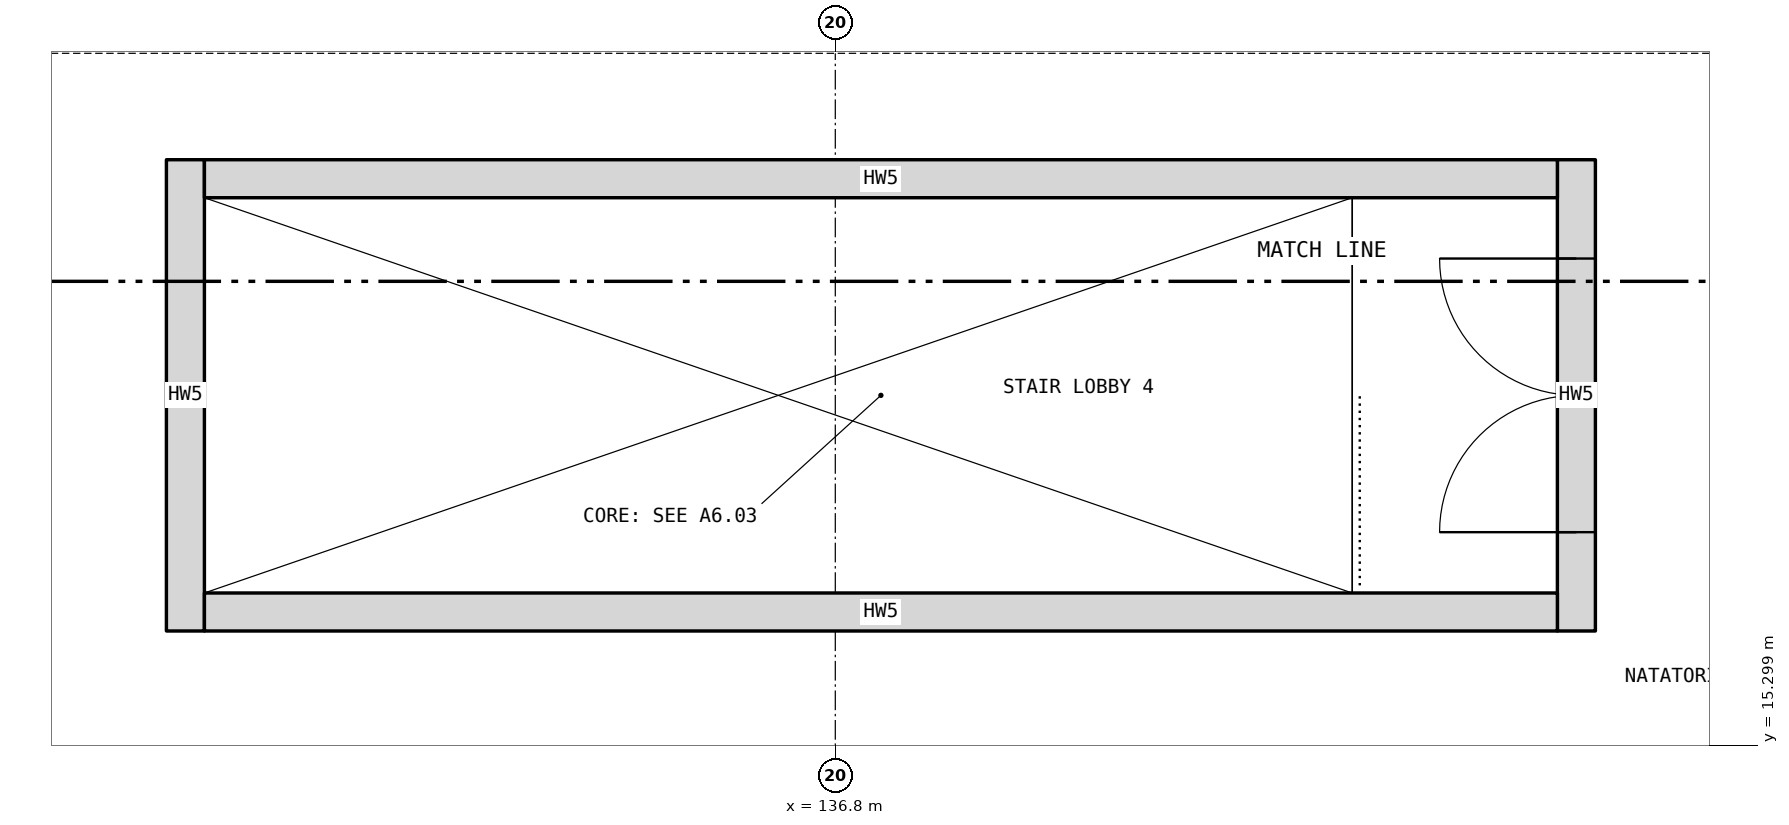
"""IFC4 building model, lengths in metres.
Left out: names, types, materials, properties, quantities, classifications, styles, units other than length and angle.
Written with IfcOpenShell. Run it as: python <this file> out.ifc"""

import sys

from ifc_helpers import new_model, si_unit, direction, frame, frame_2d, origin, place, context, subcontext, project, spatial, rectangle, extrude, element, fill, save


model = new_model("IFC4")
c1 = context("Model", 3, precision=1e-05, world=origin(), true_north=direction((0.0, 1.0)))
c2 = subcontext(c1, "Body", "Model", "MODEL_VIEW")
j1 = project(units=[si_unit("LENGTHUNIT", "METRE"), si_unit("PLANEANGLEUNIT", "RADIAN")], contexts=[c1])
p1 = place(None, origin())
s1 = spatial("IfcSite", under=j1, at=p1, CompositionType="ELEMENT")
p2 = place(p1, origin())
s2 = spatial("IfcBuilding", under=s1, at=p2, CompositionType="ELEMENT")
p3 = place(p2, origin())
s3 = spatial("IfcBuildingStorey", under=s2, at=p3, CompositionType="ELEMENT", Elevation=0.0)
p4 = place(p3, frame((132.525, 16.05, 0.0), z_axis=(0.0, 0.0, 1.0), x_axis=(0.0, 1.0, 0.0)))
e1 = element("IfcWall", 1, at=p4, inside=s3, PredefinedType="SOLIDWALL", context=c2, shape_type="SweptSolid", body=[
    extrude(rectangle(XDim=3.1, YDim=0.25, at=frame_2d((1.55, 0.0))), origin(), (0.0, 0.0, 1.0), 3.2),
])
p5 = place(p3, frame((141.675, 16.05, 0.0), z_axis=(0.0, 0.0, 1.0), x_axis=(0.0, 1.0, 0.0)))
e2 = element("IfcWall", 2, at=p5, inside=s3, PredefinedType="SOLIDWALL", context=c2, shape_type="SweptSolid", body=[
    extrude(rectangle(XDim=3.1, YDim=0.25, at=frame_2d((1.55, 0.0))), origin(), (0.0, 0.0, 1.0), 3.2),
])
p6 = place(p5, frame((0.65, 0.0, 0.0)))
e3 = element("IfcOpeningElement", 3, at=p6, cuts=e2, PredefinedType="OPENING", context=c2, shape_type="SweptSolid", body=[
    extrude(rectangle(XDim=1.8, YDim=2.1, at=frame_2d((0.9, 1.05))), frame((0.0, 0.135, 0.0), z_axis=(0.0, -1.0, 0.0), x_axis=(1.0, 0.0, 0.0)), (0.0, 0.0, 1.0), 0.27),
])
for number, where, z_axis, x_axis in (
    (4, (132.65, 16.175, 0.0), (0.0, 0.0, 1.0), (1.0, 0.0, 0.0)),
    (5, (132.65, 19.025, 0.0), (0.0, 0.0, 1.0), (1.0, 0.0, 0.0)),
):
    element("IfcWall", number, at=place(p3, frame(where, z_axis=z_axis, x_axis=x_axis)), inside=s3, PredefinedType="SOLIDWALL", context=c2, shape_type="SweptSolid", body=[
        extrude(rectangle(XDim=8.9, YDim=0.25, at=frame_2d((4.45, 0.0))), origin(), (0.0, 0.0, 1.0), 3.2),
    ])
p7 = place(p6, origin())
e6 = element("IfcDoor", 6, at=p7, inside=s3, OperationType="DOUBLE_DOOR_SINGLE_SWING", PredefinedType="DOOR", context=c2, shape_type="SweptSolid", body=[
    extrude(rectangle(XDim=1.8, YDim=2.1, at=frame_2d((0.9, 1.05))), frame((0.0, 0.025, 0.0), z_axis=(0.0, -1.0, 0.0), x_axis=(1.0, 0.0, 0.0)), (0.0, 0.0, 1.0), 0.05),
])
fill(e3, e6)
save(model, sys.argv[1])
